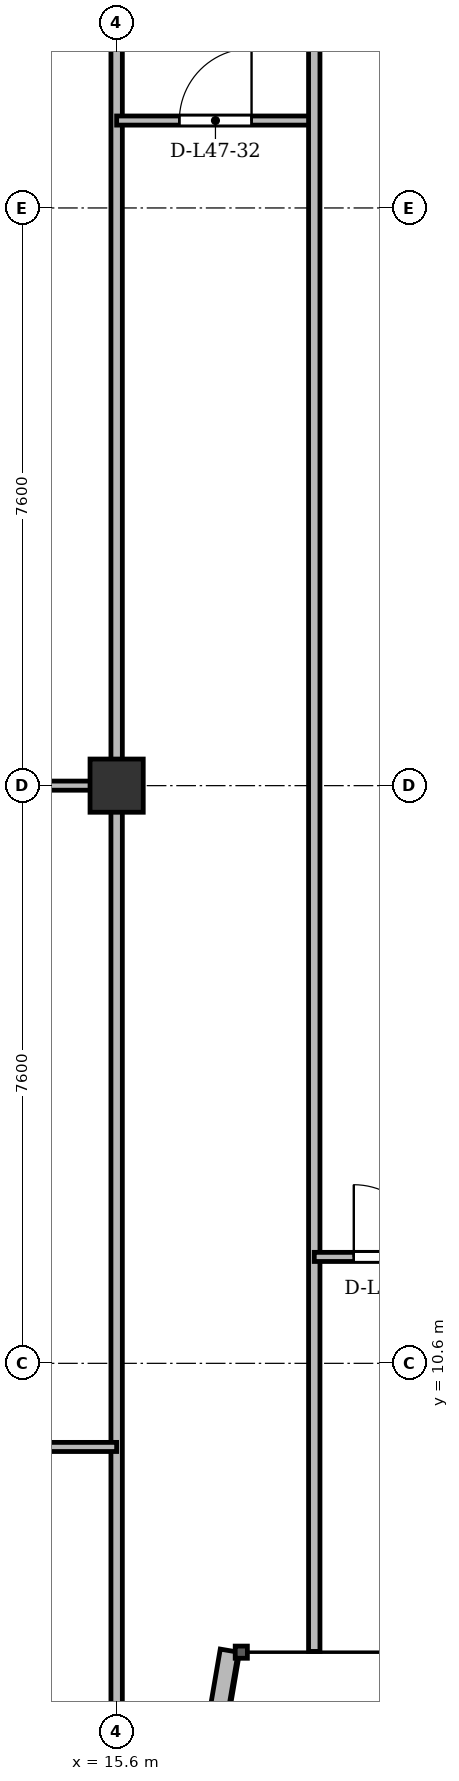
"""IFC4 building model, lengths in metres.
Left out: names, types, materials, properties, quantities, classifications, styles, units other than length and angle.
Written with IfcOpenShell. Run it as: python <this file> out.ifc"""

import sys

from ifc_helpers import new_model, si_unit, direction, frame, frame_2d, origin, origin_2d, place, context, subcontext, project, spatial, rectangle, extrude, source, transform, mapped, element, fill, save


model = new_model("IFC4")
c1 = context("Model", 3, precision=1e-05, world=origin(), true_north=direction((0.0, 1.0)))
c2 = subcontext(c1, "Body", "Model", "MODEL_VIEW")
j1 = project(units=[si_unit("LENGTHUNIT", "METRE"), si_unit("PLANEANGLEUNIT", "RADIAN")], contexts=[c1])
p1 = place(None, origin())
s1 = spatial("IfcSite", under=j1, at=p1, CompositionType="ELEMENT")
p2 = place(p1, origin())
s2 = spatial("IfcBuilding", under=s1, at=p2, CompositionType="ELEMENT")
p3 = place(p2, frame((0.0, 0.0, 178.9)))
s3 = spatial("IfcBuildingStorey", under=s2, at=p3, CompositionType="ELEMENT", Elevation=178.9)
m1 = source(origin(), c2, "Body", "SweptSolid", [
    extrude(rectangle(XDim=0.7, YDim=0.7, at=origin_2d()), origin(), (0.0, 0.0, 1.0), 3.6),
])
p4 = place(p3, frame((15.6, 18.2, 0.0), z_axis=(0.0, 0.0, 1.0), x_axis=(1.0, 0.0, 0.0)))
e1 = element("IfcColumn", 1, at=p4, inside=s3, PredefinedType="COLUMN", context=c2, shape_type="MappedRepresentation", body=[
    mapped(m1, transform((0.0, 0.0, 0.0), x_axis=(1.0, 0.0, 0.0), y_axis=(0.0, 1.0, 0.0), z_axis=(0.0, 0.0, 1.0), scale=1.0)),
])
p5 = place(p3, frame((17.082, 6.82, 0.0), z_axis=(0.0, 0.0, 1.0), x_axis=(-0.168990530437, -0.98561767467, 0.0)))
e2 = element("IfcWall", 2, at=p5, inside=s3, PredefinedType="SOLIDWALL", context=c2, shape_type="SweptSolid", body=[
    extrude(rectangle(XDim=3.551, YDim=0.24, at=frame_2d((1.775, 0.0))), origin(), (0.0, 0.0, 1.0), 2.62),
])
p6 = place(p3, frame((15.6, 3.525, 0.0), z_axis=(0.0, 0.0, 1.0), x_axis=(0.0, 1.0, 0.0)))
e3 = element("IfcWall", 3, at=p6, inside=s3, PredefinedType="PARTITIONING", context=c2, shape_type="SweptSolid", body=[
    extrude(rectangle(XDim=27.275, YDim=0.15, at=frame_2d((13.638, 0.0))), origin(), (0.0, 0.0, 1.0), 2.72),
])
p7 = place(p3, frame((8.04, 18.2, 0.0), z_axis=(0.0, 0.0, 1.0), x_axis=(1.0, 0.0, 0.0)))
e4 = element("IfcWall", 4, at=p7, inside=s3, PredefinedType="PARTITIONING", context=c2, shape_type="SweptSolid", body=[
    extrude(rectangle(XDim=7.56, YDim=0.12, at=frame_2d((3.78, 0.0))), origin(), (0.0, 0.0, 1.0), 2.62),
])
p8 = place(p7, frame((3.305, 0.0, 0.0)))
e5 = element("IfcOpeningElement", 5, at=p8, cuts=e4, PredefinedType="OPENING", context=c2, shape_type="SweptSolid", body=[
    extrude(rectangle(XDim=0.95, YDim=2.15, at=frame_2d((0.475, 1.075))), frame((0.0, 0.07, 0.0), z_axis=(0.0, -1.0, 0.0), x_axis=(1.0, 0.0, 0.0)), (0.0, 0.0, 1.0), 0.14),
])
p9 = place(p3, frame((8.04, 9.5, 0.0), z_axis=(0.0, 0.0, 1.0), x_axis=(1.0, 0.0, 0.0)))
e6 = element("IfcWall", 6, at=p9, inside=s3, PredefinedType="PARTITIONING", context=c2, shape_type="SweptSolid", body=[
    extrude(rectangle(XDim=7.56, YDim=0.12, at=frame_2d((3.78, 0.0))), origin(), (0.0, 0.0, 1.0), 2.72),
])
p10 = place(p9, frame((3.305, 0.0, 0.0)))
e7 = element("IfcOpeningElement", 7, at=p10, cuts=e6, PredefinedType="OPENING", context=c2, shape_type="SweptSolid", body=[
    extrude(rectangle(XDim=0.95, YDim=2.15, at=frame_2d((0.475, 1.075))), frame((0.0, 0.07, 0.0), z_axis=(0.0, -1.0, 0.0), x_axis=(1.0, 0.0, 0.0)), (0.0, 0.0, 1.0), 0.14),
])
p11 = place(p3, frame((15.6, 26.95, 0.0), z_axis=(0.0, 0.0, 1.0), x_axis=(1.0, 0.0, 0.0)))
e8 = element("IfcWall", 8, at=p11, inside=s3, PredefinedType="PARTITIONING", context=c2, shape_type="SweptSolid", body=[
    extrude(rectangle(XDim=2.6, YDim=0.12, at=frame_2d((1.3, 0.0))), origin(), (0.0, 0.0, 1.0), 2.72),
])
p12 = place(p11, frame((0.825, 0.0, 0.0)))
e9 = element("IfcOpeningElement", 9, at=p12, cuts=e8, PredefinedType="OPENING", context=c2, shape_type="SweptSolid", body=[
    extrude(rectangle(XDim=0.95, YDim=2.15, at=frame_2d((0.475, 1.075))), frame((0.0, 0.07, 0.0), z_axis=(0.0, -1.0, 0.0), x_axis=(1.0, 0.0, 0.0)), (0.0, 0.0, 1.0), 0.14),
])
p13 = place(p3, frame((18.2, 6.81, 0.0), z_axis=(0.0, 0.0, 1.0), x_axis=(0.0, 1.0, 0.0)))
e10 = element("IfcWall", 10, at=p13, inside=s3, PredefinedType="PARTITIONING", context=c2, shape_type="SweptSolid", body=[
    extrude(rectangle(XDim=23.99, YDim=0.15, at=frame_2d((11.995, 0.0))), origin(), (0.0, 0.0, 1.0), 2.62),
])
p14 = place(p3, frame((18.2, 12.0, 0.0), z_axis=(0.0, 0.0, 1.0), x_axis=(1.0, 0.0, 0.0)))
e11 = element("IfcWall", 11, at=p14, inside=s3, PredefinedType="PARTITIONING", context=c2, shape_type="SweptSolid", body=[
    extrude(rectangle(XDim=2.0, YDim=0.12, at=frame_2d((1.0, 0.0))), origin(), (0.0, 0.0, 1.0), 3.22),
])
p15 = place(p14, frame((0.52, 0.0, 0.0)))
e12 = element("IfcOpeningElement", 12, at=p15, cuts=e11, PredefinedType="OPENING", context=c2, shape_type="SweptSolid", body=[
    extrude(rectangle(XDim=0.95, YDim=2.15, at=frame_2d((0.475, 1.075))), frame((0.0, 0.07, 0.0), z_axis=(0.0, -1.0, 0.0), x_axis=(1.0, 0.0, 0.0)), (0.0, 0.0, 1.0), 0.14),
])
m2 = source(origin(), c2, "Body", "SweptSolid", [
    extrude(rectangle(XDim=0.95, YDim=2.15, at=frame_2d((0.475, 1.075))), frame((0.0, 0.025, 0.0), z_axis=(0.0, -1.0, 0.0), x_axis=(1.0, 0.0, 0.0)), (0.0, 0.0, 1.0), 0.05),
])
p16 = place(p12, origin())
e13 = element("IfcDoor", 13, at=p16, inside=s3, OperationType="SINGLE_SWING_RIGHT", PredefinedType="DOOR", context=c2, shape_type="MappedRepresentation", body=[
    mapped(m2, transform((0.0, 0.0, 0.0), x_axis=(1.0, 0.0, 0.0), y_axis=(0.0, 1.0, 0.0), z_axis=(0.0, 0.0, 1.0), scale=1.0)),
])
fill(e9, e13)
p17 = place(p15, origin())
e14 = element("IfcDoor", 14, at=p17, inside=s3, OperationType="SINGLE_SWING_LEFT", PredefinedType="DOOR", context=c2, shape_type="MappedRepresentation", body=[
    mapped(m2, transform((0.0, 0.0, 0.0), x_axis=(1.0, 0.0, 0.0), y_axis=(0.0, 1.0, 0.0), z_axis=(0.0, 0.0, 1.0), scale=1.0)),
])
fill(e12, e14)
save(model, sys.argv[1])
